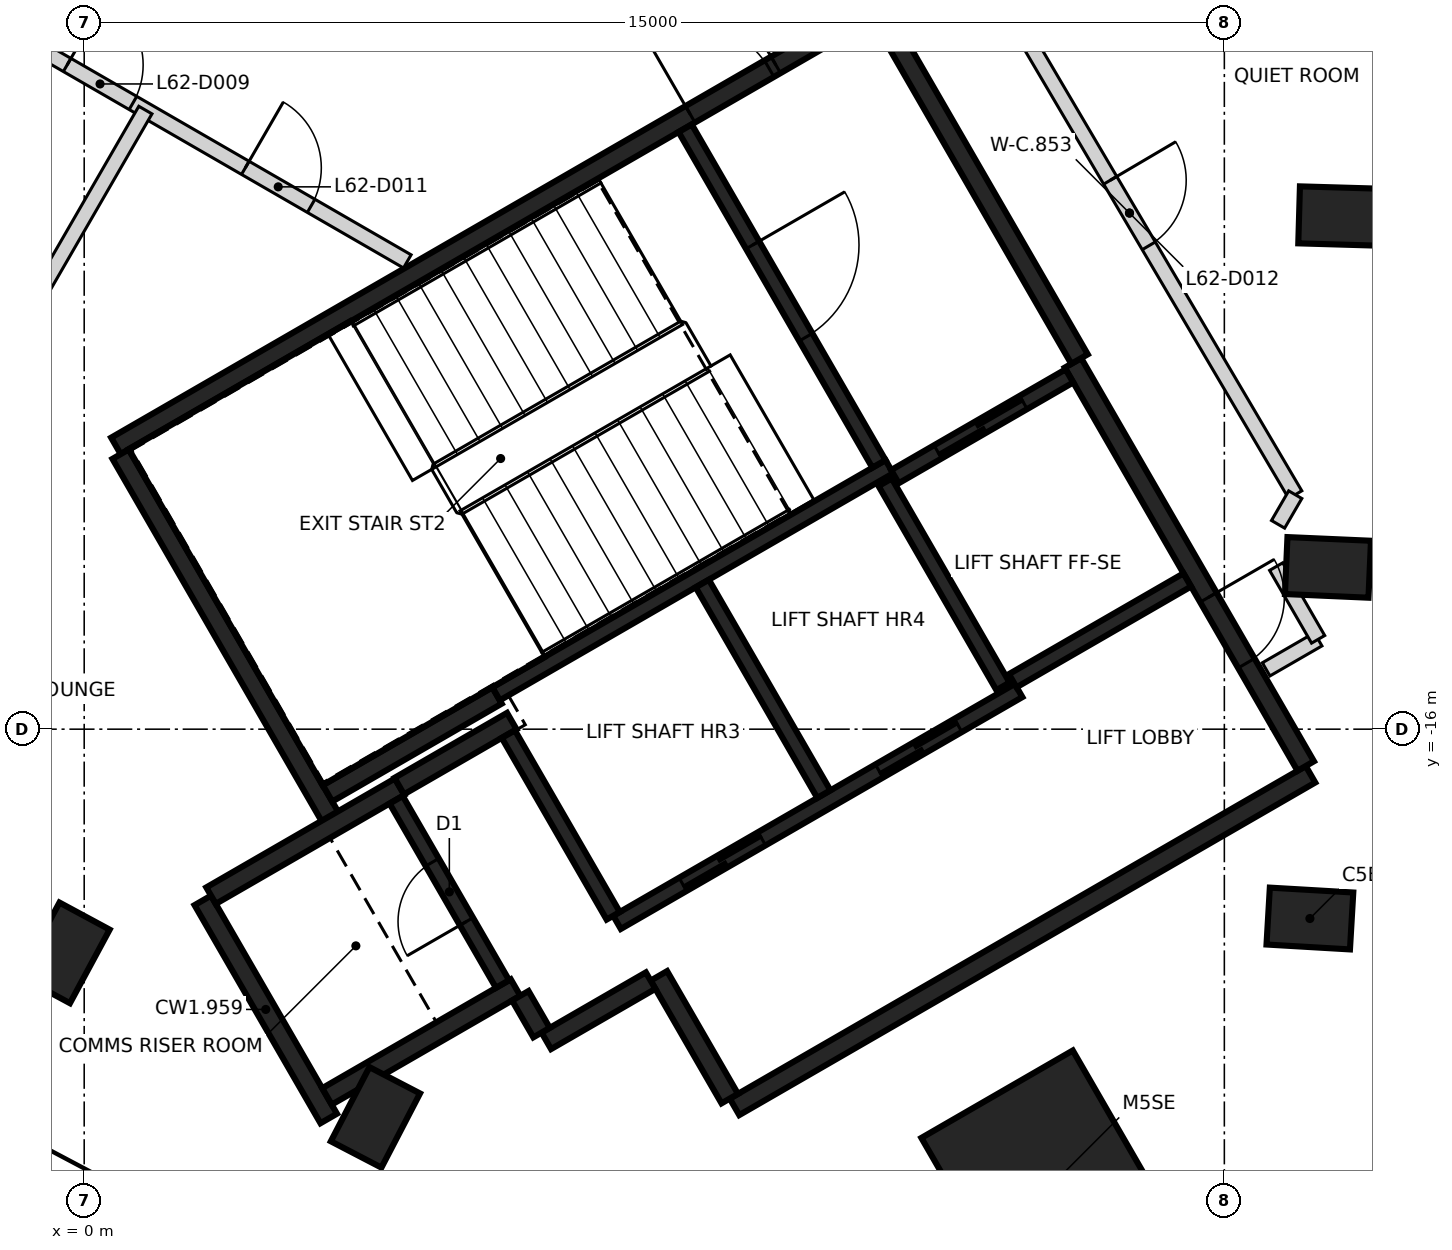
"""IFC4 building model, lengths in metres.
Left out: names, types, materials, properties, quantities, classifications, styles, units other than length and angle.
Written with IfcOpenShell. Run it as: python <this file> out.ifc"""

import sys

from ifc_helpers import new_model, si_unit, direction, frame, frame_2d, origin, origin_2d, place, context, subcontext, project, spatial, rectangle, extrude, element, fill, save


model = new_model("IFC4")
c1 = context("Model", 3, precision=1e-05, world=origin(), true_north=direction((0.0, 1.0)))
c2 = subcontext(c1, "Body", "Model", "MODEL_VIEW")
j1 = project(units=[si_unit("LENGTHUNIT", "METRE"), si_unit("PLANEANGLEUNIT", "RADIAN")], contexts=[c1])
p1 = place(None, origin())
s1 = spatial("IfcSite", under=j1, at=p1, CompositionType="ELEMENT")
p2 = place(p1, origin())
s2 = spatial("IfcBuilding", under=s1, at=p2, CompositionType="ELEMENT")
p3 = place(p2, frame((0.0, 0.0, 246.6)))
s3 = spatial("IfcBuildingStorey", under=s2, at=p3, CompositionType="ELEMENT", Elevation=246.6)
for number, where, z_axis, x_axis in (
    (1, (16.125, -18.491, -0.35), (0.0, 0.0, 1.0), (-0.998, 0.058, 0.0)),
    (2, (16.363, -13.872, -0.35), (0.0, 0.0, 1.0), (-0.999, 0.044, 0.0)),
    (3, (16.533, -9.25, -0.35), (0.0, 0.0, 1.0), (-1.0, 0.029, 0.0)),
    (4, (-0.256, -18.943, -0.35), (0.0, 0.0, 1.0), (0.475, 0.88, 0.0)),
    (5, (3.832, -21.107, -0.35), (0.0, 0.0, 1.0), (0.461, 0.887, 0.0)),
):
    element("IfcColumn", number, at=place(p3, frame(where, z_axis=z_axis, x_axis=x_axis)), inside=s3, PredefinedType="COLUMN", context=c2, shape_type="SweptSolid", body=[
        extrude(rectangle(XDim=1.1, YDim=0.75, at=origin_2d()), origin(), (0.0, 0.0, 1.0), 3.6),
    ])
p4 = place(p3, frame((12.71, -22.015, -0.35), z_axis=(0.0, 0.0, 1.0), x_axis=(-0.5, 0.866025403784, 0.0)))
e6 = element("IfcColumn", 6, at=p4, inside=s3, PredefinedType="COLUMN", context=c2, shape_type="SweptSolid", body=[
    extrude(rectangle(XDim=2.8, YDim=2.3, at=origin_2d()), origin(), (0.0, 0.0, 1.0), 3.6),
])
p5 = place(p3, frame((0.417, -12.273, 0.0), z_axis=(0.0, 0.0, 1.0), x_axis=(0.866021906294, 0.500006057782, 0.0)))
e7 = element("IfcWall", 7, at=p5, inside=s3, PredefinedType="SHEAR", context=c2, shape_type="SweptSolid", body=[
    extrude(rectangle(XDim=11.55, YDim=0.25, at=frame_2d((5.775, 0.0))), origin(), (0.0, 0.0, 1.0), 3.25),
])
p6 = place(p5, frame((10.025, 0.0, 0.0)))
e8 = element("IfcOpeningElement", 8, at=p6, cuts=e7, PredefinedType="OPENING", context=c2, shape_type="SweptSolid", body=[
    extrude(rectangle(XDim=1.2, YDim=2.1, at=frame_2d((0.6, 1.05))), frame((0.0, 0.135, 0.0), z_axis=(0.0, -1.0, 0.0), x_axis=(1.0, 0.0, 0.0)), (0.0, 0.0, 1.0), 0.27),
])
p7 = place(p5, frame((8.725, 0.0, 0.0)))
e9 = element("IfcOpeningElement", 9, at=p7, cuts=e7, PredefinedType="OPENING", context=c2, shape_type="SweptSolid", body=[
    extrude(rectangle(XDim=1.2, YDim=2.1, at=frame_2d((0.6, 1.05))), frame((0.0, 0.135, 0.0), z_axis=(0.0, -1.0, 0.0), x_axis=(1.0, 0.0, 0.0)), (0.0, 0.0, 1.0), 0.27),
])
p8 = place(p3, frame((16.133, -16.594, 0.0), z_axis=(0.0, 0.0, 1.0), x_axis=(-0.866022959057, -0.500004234368, 0.0)))
e10 = element("IfcWall", 10, at=p8, inside=s3, PredefinedType="SHEAR", context=c2, shape_type="SweptSolid", body=[
    extrude(rectangle(XDim=8.75, YDim=0.25, at=frame_2d((4.375, 0.0))), origin(), (0.0, 0.0, 1.0), 3.25),
])
p9 = place(p3, frame((13.008, -11.181, 0.0), z_axis=(0.0, 0.0, 1.0), x_axis=(0.500001955336, -0.866024274868, 0.0)))
e11 = element("IfcWall", 11, at=p9, inside=s3, PredefinedType="SHEAR", context=c2, shape_type="SweptSolid", body=[
    extrude(rectangle(XDim=6.125, YDim=0.25, at=frame_2d((3.062, 0.0))), origin(), (0.0, 0.0, 1.0), 3.25),
])
p10 = place(p9, frame((3.563, 0.0, 0.0)))
e12 = element("IfcOpeningElement", 12, at=p10, cuts=e11, PredefinedType="OPENING", context=c2, shape_type="SweptSolid", body=[
    extrude(rectangle(XDim=1.0, YDim=2.1, at=frame_2d((0.5, 1.05))), frame((0.0, 0.135, 0.0), z_axis=(0.0, -1.0, 0.0), x_axis=(1.0, 0.0, 0.0)), (0.0, 0.0, 1.0), 0.27),
])
p11 = place(p3, frame((3.235, -17.153, 0.0), z_axis=(0.0, 0.0, 1.0), x_axis=(-0.500008851346, 0.866020293397, 0.0)))
e13 = element("IfcWall", 13, at=p11, inside=s3, PredefinedType="SHEAR", context=c2, shape_type="SweptSolid", body=[
    extrude(rectangle(XDim=5.51, YDim=0.25, at=frame_2d((2.755, 0.0))), origin(), (0.0, 0.0, 1.0), 3.25),
])
p12 = place(p3, frame((10.483, -6.606, 0.0), z_axis=(0.0, 0.0, 1.0), x_axis=(0.49999885962, -0.866026062182, 0.0)))
e14 = element("IfcWall", 14, at=p12, inside=s3, PredefinedType="SHEAR", context=c2, shape_type="SweptSolid", body=[
    extrude(rectangle(XDim=5.225, YDim=0.25, at=frame_2d((2.612, 0.0))), origin(), (0.0, 0.0, 1.0), 3.25),
])
p13 = place(p3, frame((3.217, -21.122, 0.0), z_axis=(0.0, 0.0, 1.0), x_axis=(-0.499998874531, 0.866026053573, 0.0)))
e15 = element("IfcWall", 15, at=p13, inside=s3, PredefinedType="SHEAR", context=c2, shape_type="SweptSolid", body=[
    extrude(rectangle(XDim=3.313, YDim=0.25, at=frame_2d((1.656, 0.0))), origin(), (0.0, 0.0, 1.0), 3.25),
])
p14 = place(p3, frame((1.669, -18.19, 0.0), z_axis=(0.0, 0.0, 1.0), x_axis=(0.866042235819, 0.499970844928, 0.0)))
e16 = element("IfcWall", 16, at=p14, inside=s3, PredefinedType="SHEAR", context=c2, shape_type="SweptSolid", body=[
    extrude(rectangle(XDim=2.865, YDim=0.25, at=frame_2d((1.432, 0.0))), origin(), (0.0, 0.0, 1.0), 3.25),
])
p15 = place(p3, frame((5.675, -19.399, 0.0), z_axis=(0.0, 0.0, 1.0), x_axis=(-0.866026637627, -0.499997862916, 0.0)))
e17 = element("IfcWall", 17, at=p15, inside=s3, PredefinedType="SHEAR", context=c2, shape_type="SweptSolid", body=[
    extrude(rectangle(XDim=2.865, YDim=0.25, at=frame_2d((1.432, 0.0))), origin(), (0.0, 0.0, 1.0), 3.25),
])
p16 = place(p3, frame((5.431, -15.556, 0.0), z_axis=(0.0, 0.0, 1.0), x_axis=(-0.866022940537, -0.500004266446, 0.0)))
e18 = element("IfcWall", 18, at=p16, inside=s3, PredefinedType="SHEAR", context=c2, shape_type="SweptSolid", body=[
    extrude(rectangle(XDim=2.575, YDim=0.25, at=frame_2d((1.287, 0.0))), origin(), (0.0, 0.0, 1.0), 3.25),
])
p17 = place(p3, frame((8.493, -20.86, 0.0), z_axis=(0.0, 0.0, 1.0), x_axis=(-0.500039802285, 0.866002422705, 0.0)))
e19 = element("IfcWall", 19, at=p17, inside=s3, PredefinedType="SHEAR", context=c2, shape_type="SweptSolid", body=[
    extrude(rectangle(XDim=1.865, YDim=0.25, at=frame_2d((0.932, 0.0))), origin(), (0.0, 0.0, 1.0), 3.25),
])
p18 = place(p3, frame((4.145, -16.749, 0.0), z_axis=(0.0, 0.0, 1.0), x_axis=(0.866038183914, 0.499977863513, 0.0)))
e20 = element("IfcWall", 20, at=p18, inside=s3, PredefinedType="SHEAR", context=c2, shape_type="SweptSolid", body=[
    extrude(rectangle(XDim=1.71, YDim=0.25, at=frame_2d((0.855, 0.0))), origin(), (0.0, 0.0, 1.0), 3.25),
])
p19 = place(p3, frame((7.452, -19.308, 0.0), z_axis=(0.0, 0.0, 1.0), x_axis=(-0.866044474677, -0.49996696679, 0.0)))
e21 = element("IfcWall", 21, at=p19, inside=s3, PredefinedType="SHEAR", context=c2, shape_type="SweptSolid", body=[
    extrude(rectangle(XDim=1.584, YDim=0.25, at=frame_2d((0.792, 0.0))), origin(), (0.0, 0.0, 1.0), 3.25),
])
p20 = place(p3, frame((6.017, -19.992, 0.0), z_axis=(0.0, 0.0, 1.0), x_axis=(-0.500364886717, 0.865814633822, 0.0)))
e22 = element("IfcWall", 22, at=p20, inside=s3, PredefinedType="SHEAR", context=c2, shape_type="SweptSolid", body=[
    extrude(rectangle(XDim=0.559, YDim=0.25, at=frame_2d((0.28, 0.0))), origin(), (0.0, 0.0, 1.0), 3.25),
])
p21 = place(p3, frame((5.419, -15.534, 0.0), z_axis=(0.0, 0.0, 1.0), x_axis=(0.866029065029, 0.499993658486, 0.0)))
e23 = element("IfcWall", 23, at=p21, inside=s3, PredefinedType="SHEAR", context=c2, shape_type="SweptSolid", body=[
    extrude(rectangle(XDim=5.974, YDim=0.2, at=frame_2d((2.987, 0.0))), origin(), (0.0, 0.0, 1.0), 3.25),
])
p22 = place(p3, frame((7.01, -18.542, 0.0), z_axis=(0.0, 0.0, 1.0), x_axis=(0.866030299012, 0.499991521122, 0.0)))
e24 = element("IfcWall", 24, at=p22, inside=s3, PredefinedType="SHEAR", context=c2, shape_type="SweptSolid", body=[
    extrude(rectangle(XDim=6.1, YDim=0.2, at=frame_2d((3.05, 0.0))), origin(), (0.0, 0.0, 1.0), 3.25),
])
p23 = place(p22, frame((1.0, 0.0, 0.0)))
e25 = element("IfcOpeningElement", 25, at=p23, cuts=e24, PredefinedType="OPENING", context=c2, shape_type="SweptSolid", body=[
    extrude(rectangle(XDim=1.2, YDim=2.1, at=frame_2d((0.6, 1.05))), frame((0.0, 0.11, 0.0), z_axis=(0.0, -1.0, 0.0), x_axis=(1.0, 0.0, 0.0)), (0.0, 0.0, 1.0), 0.22),
])
p24 = place(p22, frame((3.982, 0.0, 0.0)))
e26 = element("IfcOpeningElement", 26, at=p24, cuts=e24, PredefinedType="OPENING", context=c2, shape_type="SweptSolid", body=[
    extrude(rectangle(XDim=1.2, YDim=2.1, at=frame_2d((0.6, 1.05))), frame((0.0, 0.11, 0.0), z_axis=(0.0, -1.0, 0.0), x_axis=(1.0, 0.0, 0.0)), (0.0, 0.0, 1.0), 0.22),
])
p25 = place(p3, frame((7.906, -8.094, 0.0), z_axis=(0.0, 0.0, 1.0), x_axis=(0.500027839223, -0.866009330205, 0.0)))
e27 = element("IfcWall", 27, at=p25, inside=s3, PredefinedType="SHEAR", context=c2, shape_type="SweptSolid", body=[
    extrude(rectangle(XDim=5.098, YDim=0.2, at=frame_2d((2.549, 0.0))), origin(), (0.0, 0.0, 1.0), 3.25),
])
p26 = place(p25, frame((1.774, 0.0, 0.0)))
e28 = element("IfcOpeningElement", 28, at=p26, cuts=e27, PredefinedType="OPENING", context=c2, shape_type="SweptSolid", body=[
    extrude(rectangle(XDim=1.4, YDim=2.1, at=frame_2d((0.7, 1.05))), frame((0.0, 0.11, 0.0), z_axis=(0.0, -1.0, 0.0), x_axis=(1.0, 0.0, 0.0)), (0.0, 0.0, 1.0), 0.22),
])
p27 = place(p3, frame((8.132, -14.084, 0.0), z_axis=(0.0, 0.0, 1.0), x_axis=(0.499997778408, -0.866026686418, 0.0)))
e29 = element("IfcWall", 29, at=p27, inside=s3, PredefinedType="SHEAR", context=c2, shape_type="SweptSolid", body=[
    extrude(rectangle(XDim=3.198, YDim=0.2, at=frame_2d((1.599, 0.0))), origin(), (0.0, 0.0, 1.0), 3.25),
])
p28 = place(p3, frame((5.503, -19.352, 0.0), z_axis=(0.0, 0.0, 1.0), x_axis=(-0.499986818241, 0.866033014143, 0.0)))
e30 = element("IfcWall", 30, at=p28, inside=s3, PredefinedType="SHEAR", context=c2, shape_type="SweptSolid", body=[
    extrude(rectangle(XDim=2.798, YDim=0.2, at=frame_2d((1.399, 0.0))), origin(), (0.0, 0.0, 1.0), 3.25),
])
p29 = place(p28, frame((0.949, 0.0, 0.0)))
e31 = element("IfcOpeningElement", 31, at=p29, cuts=e30, PredefinedType="OPENING", context=c2, shape_type="SweptSolid", body=[
    extrude(rectangle(XDim=0.9, YDim=2.1, at=frame_2d((0.45, 1.05))), frame((0.0, 0.11, 0.0), z_axis=(0.0, -1.0, 0.0), x_axis=(1.0, 0.0, 0.0)), (0.0, 0.0, 1.0), 0.22),
])
p30 = place(p3, frame((6.96, -18.455, 0.0), z_axis=(0.0, 0.0, 1.0), x_axis=(-0.499926705758, 0.866067716099, 0.0)))
e32 = element("IfcWall", 32, at=p30, inside=s3, PredefinedType="SHEAR", context=c2, shape_type="SweptSolid", body=[
    extrude(rectangle(XDim=2.759, YDim=0.2, at=frame_2d((1.38, 0.0))), origin(), (0.0, 0.0, 1.0), 3.25),
])
p31 = place(p3, frame((12.088, -15.437, 0.0), z_axis=(0.0, 0.0, 1.0), x_axis=(-0.500026960575, 0.86600983753, 0.0)))
e33 = element("IfcWall", 33, at=p31, inside=s3, PredefinedType="SHEAR", context=c2, shape_type="SweptSolid", body=[
    extrude(rectangle(XDim=3.1, YDim=0.2, at=frame_2d((1.55, 0.0))), origin(), (0.0, 0.0, 1.0), 3.25),
])
p32 = place(p3, frame((10.666, -12.678, 0.0), z_axis=(0.0, 0.0, 1.0), x_axis=(0.866018407898, 0.500012117035, 0.0)))
e34 = element("IfcWall", 34, at=p32, inside=s3, PredefinedType="SHEAR", context=c2, shape_type="SweptSolid", body=[
    extrude(rectangle(XDim=2.651, YDim=0.2, at=frame_2d((1.325, 0.0))), origin(), (0.0, 0.0, 1.0), 3.25),
])
p33 = place(p32, frame((0.652, 0.0, 0.0)))
e35 = element("IfcOpeningElement", 35, at=p33, cuts=e34, PredefinedType="OPENING", context=c2, shape_type="SweptSolid", body=[
    extrude(rectangle(XDim=1.3, YDim=2.1, at=frame_2d((0.65, 1.05))), frame((0.0, 0.11, 0.0), z_axis=(0.0, -1.0, 0.0), x_axis=(1.0, 0.0, 0.0)), (0.0, 0.0, 1.0), 0.22),
])
p34 = place(p3, frame((14.512, -14.037, 0.0), z_axis=(0.0, 0.0, 1.0), x_axis=(-0.866018407898, -0.500012117035, 0.0)))
e36 = element("IfcWall", 36, at=p34, inside=s3, PredefinedType="SHEAR", context=c2, shape_type="SweptSolid", body=[
    extrude(rectangle(XDim=2.651, YDim=0.2, at=frame_2d((1.325, 0.0))), origin(), (0.0, 0.0, 1.0), 3.25),
])
p35 = place(p3, frame((-7.289, -3.182, 0.0), z_axis=(0.0, 0.0, 1.0), x_axis=(0.865979329032, -0.500079795322, 0.0)))
e37 = element("IfcWall", 37, at=p35, inside=s3, PredefinedType="PARTITIONING", context=c2, shape_type="SweptSolid", body=[
    extrude(rectangle(XDim=13.326, YDim=0.2, at=frame_2d((6.663, 0.0))), origin(), (0.0, 0.0, 1.0), 3.25),
])
p36 = place(p35, frame((8.158, 0.0, 0.0)))
e38 = element("IfcOpeningElement", 38, at=p36, cuts=e37, PredefinedType="OPENING", context=c2, shape_type="SweptSolid", body=[
    extrude(rectangle(XDim=1.0, YDim=2.1, at=frame_2d((0.5, 1.05))), frame((0.0, 0.11, 0.0), z_axis=(0.0, -1.0, 0.0), x_axis=(1.0, 0.0, 0.0)), (0.0, 0.0, 1.0), 0.22),
])
p37 = place(p35, frame((10.865, 0.0, 0.0)))
e39 = element("IfcOpeningElement", 39, at=p37, cuts=e37, PredefinedType="OPENING", context=c2, shape_type="SweptSolid", body=[
    extrude(rectangle(XDim=1.0, YDim=2.1, at=frame_2d((0.5, 1.05))), frame((0.0, 0.11, 0.0), z_axis=(0.0, -1.0, 0.0), x_axis=(1.0, 0.0, 0.0)), (0.0, 0.0, 1.0), 0.22),
])
p38 = place(p3, frame((11.571, -5.505, 0.0), z_axis=(0.0, 0.0, 1.0), x_axis=(0.507291838928, -0.861774326699, 0.0)))
e40 = element("IfcWall", 40, at=p38, inside=s3, PredefinedType="PARTITIONING", context=c2, shape_type="SweptSolid", body=[
    extrude(rectangle(XDim=8.599, YDim=0.2, at=frame_2d((4.299, 0.0))), origin(), (0.0, 0.0, 1.0), 3.25),
])
p39 = place(p38, frame((3.799, 0.0, 0.0)))
e41 = element("IfcOpeningElement", 41, at=p39, cuts=e40, PredefinedType="OPENING", context=c2, shape_type="SweptSolid", body=[
    extrude(rectangle(XDim=1.0, YDim=2.1, at=frame_2d((0.5, 1.05))), frame((0.0, 0.11, 0.0), z_axis=(0.0, -1.0, 0.0), x_axis=(1.0, 0.0, 0.0)), (0.0, 0.0, 1.0), 0.22),
])
p40 = place(p3, frame((15.55, -15.213, 0.0), z_axis=(0.0, 0.0, 1.0), x_axis=(0.865989998118, 0.500061319399, 0.0)))
e42 = element("IfcWall", 42, at=p40, inside=s3, PredefinedType="PARTITIONING", context=c2, shape_type="SweptSolid", body=[
    extrude(rectangle(XDim=0.79, YDim=0.2, at=frame_2d((0.395, 0.0))), origin(), (0.0, 0.0, 1.0), 2.35),
])
p41 = place(p3, frame((15.933, -12.915, 0.0), z_axis=(0.0, 0.0, 1.0), x_axis=(-0.502017930819, -0.864857211993, 0.0)))
e43 = element("IfcWall", 43, at=p41, inside=s3, PredefinedType="PARTITIONING", context=c2, shape_type="SweptSolid", body=[
    extrude(rectangle(XDim=0.451, YDim=0.2, at=frame_2d((0.226, 0.0))), origin(), (0.0, 0.0, 1.0), 3.25),
])
p42 = place(p3, frame((15.682, -13.861, 0.0), z_axis=(0.0, 0.0, 1.0), x_axis=(0.499633176362, -0.866237085952, 0.0)))
e44 = element("IfcWall", 44, at=p42, inside=s3, PredefinedType="PARTITIONING", context=c2, shape_type="SweptSolid", body=[
    extrude(rectangle(XDim=1.105, YDim=0.2, at=frame_2d((0.552, 0.0))), origin(), (0.0, 0.0, 1.0), 2.35),
])
p43 = place(p3, frame((-5.503, -18.781, 0.0), z_axis=(0.0, 0.0, 1.0), x_axis=(0.499968699423, 0.866043474427, 0.0)))
e45 = element("IfcWall", 45, at=p43, inside=s3, PredefinedType="PARTITIONING", context=c2, shape_type="SweptSolid", body=[
    extrude(rectangle(XDim=12.616, YDim=0.2, at=frame_2d((6.308, 0.0))), origin(), (0.0, 0.0, 1.0), 3.25),
])
p44 = place(p3, frame((18.746, -13.872, 0.0), z_axis=(0.0, 0.0, 1.0), x_axis=(-1.0, 0.0, 0.0)))
e46 = element("IfcWall", 46, at=p44, inside=s3, PredefinedType="PARTITIONING", context=c2, shape_type="SweptSolid", body=[
    extrude(rectangle(XDim=2.711, YDim=0.2, at=frame_2d((1.356, 0.0))), origin(), (0.0, 0.0, 1.0), 3.25),
])
p45 = place(p33, origin())
e47 = element("IfcDoor", 47, at=p45, inside=s3, OperationType="SLIDING_TO_RIGHT", PredefinedType="DOOR", context=c2, shape_type="SweptSolid", body=[
    extrude(rectangle(XDim=1.3, YDim=2.1, at=frame_2d((0.65, 1.05))), frame((0.0, 0.025, 0.0), z_axis=(0.0, -1.0, 0.0), x_axis=(1.0, 0.0, 0.0)), (0.0, 0.0, 1.0), 0.05),
])
fill(e35, e47)
p46 = place(p23, origin())
e48 = element("IfcDoor", 48, at=p46, inside=s3, OperationType="DOUBLE_DOOR_SLIDING", PredefinedType="DOOR", context=c2, shape_type="SweptSolid", body=[
    extrude(rectangle(XDim=1.2, YDim=2.1, at=frame_2d((0.6, 1.05))), frame((0.0, 0.025, 0.0), z_axis=(0.0, -1.0, 0.0), x_axis=(1.0, 0.0, 0.0)), (0.0, 0.0, 1.0), 0.05),
])
fill(e25, e48)
p47 = place(p24, origin())
e49 = element("IfcDoor", 49, at=p47, inside=s3, OperationType="DOUBLE_DOOR_SLIDING", PredefinedType="DOOR", context=c2, shape_type="SweptSolid", body=[
    extrude(rectangle(XDim=1.2, YDim=2.1, at=frame_2d((0.6, 1.05))), frame((0.0, 0.025, 0.0), z_axis=(0.0, -1.0, 0.0), x_axis=(1.0, 0.0, 0.0)), (0.0, 0.0, 1.0), 0.05),
])
fill(e26, e49)
p48 = place(p10, origin())
e50 = element("IfcDoor", 50, at=p48, inside=s3, OperationType="SINGLE_SWING_LEFT", PredefinedType="DOOR", context=c2, shape_type="SweptSolid", body=[
    extrude(rectangle(XDim=1.0, YDim=2.1, at=frame_2d((0.5, 1.05))), frame((0.0, 0.025, 0.0), z_axis=(0.0, -1.0, 0.0), x_axis=(1.0, 0.0, 0.0)), (0.0, 0.0, 1.0), 0.05),
])
fill(e12, e50)
p49 = place(p6, origin())
e51 = element("IfcDoor", 51, at=p49, inside=s3, OperationType="SINGLE_SWING_LEFT", PredefinedType="DOOR", context=c2, shape_type="SweptSolid", body=[
    extrude(rectangle(XDim=1.2, YDim=2.1, at=frame_2d((0.6, 1.05))), frame((0.0, 0.025, 0.0), z_axis=(0.0, -1.0, 0.0), x_axis=(1.0, 0.0, 0.0)), (0.0, 0.0, 1.0), 0.05),
])
fill(e8, e51)
p50 = place(p7, origin())
e52 = element("IfcDoor", 52, at=p50, inside=s3, OperationType="SINGLE_SWING_RIGHT", PredefinedType="DOOR", context=c2, shape_type="SweptSolid", body=[
    extrude(rectangle(XDim=1.2, YDim=2.1, at=frame_2d((0.6, 1.05))), frame((0.0, 0.025, 0.0), z_axis=(0.0, -1.0, 0.0), x_axis=(1.0, 0.0, 0.0)), (0.0, 0.0, 1.0), 0.05),
])
fill(e9, e52)
p51 = place(p26, origin())
e53 = element("IfcDoor", 53, at=p51, inside=s3, OperationType="SINGLE_SWING_RIGHT", PredefinedType="DOOR", context=c2, shape_type="SweptSolid", body=[
    extrude(rectangle(XDim=1.4, YDim=2.1, at=frame_2d((0.7, 1.05))), frame((0.0, 0.025, 0.0), z_axis=(0.0, -1.0, 0.0), x_axis=(1.0, 0.0, 0.0)), (0.0, 0.0, 1.0), 0.05),
])
fill(e28, e53)
p52 = place(p29, origin())
e54 = element("IfcDoor", 54, at=p52, inside=s3, OperationType="SINGLE_SWING_LEFT", PredefinedType="DOOR", context=c2, shape_type="SweptSolid", body=[
    extrude(rectangle(XDim=0.9, YDim=2.1, at=frame_2d((0.45, 1.05))), frame((0.0, 0.025, 0.0), z_axis=(0.0, -1.0, 0.0), x_axis=(1.0, 0.0, 0.0)), (0.0, 0.0, 1.0), 0.05),
])
fill(e31, e54)
p53 = place(p36, frame((1.0, 0.0, 0.0), z_axis=(0.0, 0.0, 1.0), x_axis=(-1.0, 0.0, 0.0)))
e55 = element("IfcDoor", 55, at=p53, inside=s3, OperationType="SINGLE_SWING_LEFT", PredefinedType="DOOR", context=c2, shape_type="SweptSolid", body=[
    extrude(rectangle(XDim=1.0, YDim=2.1, at=frame_2d((0.5, 1.05))), frame((0.0, 0.025, 0.0), z_axis=(0.0, -1.0, 0.0), x_axis=(1.0, 0.0, 0.0)), (0.0, 0.0, 1.0), 0.05),
])
fill(e38, e55)
p54 = place(p37, frame((1.0, 0.0, 0.0), z_axis=(0.0, 0.0, 1.0), x_axis=(-1.0, 0.0, 0.0)))
e56 = element("IfcDoor", 56, at=p54, inside=s3, OperationType="SINGLE_SWING_LEFT", PredefinedType="DOOR", context=c2, shape_type="SweptSolid", body=[
    extrude(rectangle(XDim=1.0, YDim=2.1, at=frame_2d((0.5, 1.05))), frame((0.0, 0.025, 0.0), z_axis=(0.0, -1.0, 0.0), x_axis=(1.0, 0.0, 0.0)), (0.0, 0.0, 1.0), 0.05),
])
fill(e39, e56)
p55 = place(p39, origin())
e57 = element("IfcDoor", 57, at=p55, inside=s3, OperationType="SINGLE_SWING_LEFT", PredefinedType="DOOR", context=c2, shape_type="SweptSolid", body=[
    extrude(rectangle(XDim=1.0, YDim=2.1, at=frame_2d((0.5, 1.05))), frame((0.0, 0.025, 0.0), z_axis=(0.0, -1.0, 0.0), x_axis=(1.0, 0.0, 0.0)), (0.0, 0.0, 1.0), 0.05),
])
fill(e41, e57)
save(model, sys.argv[1])
